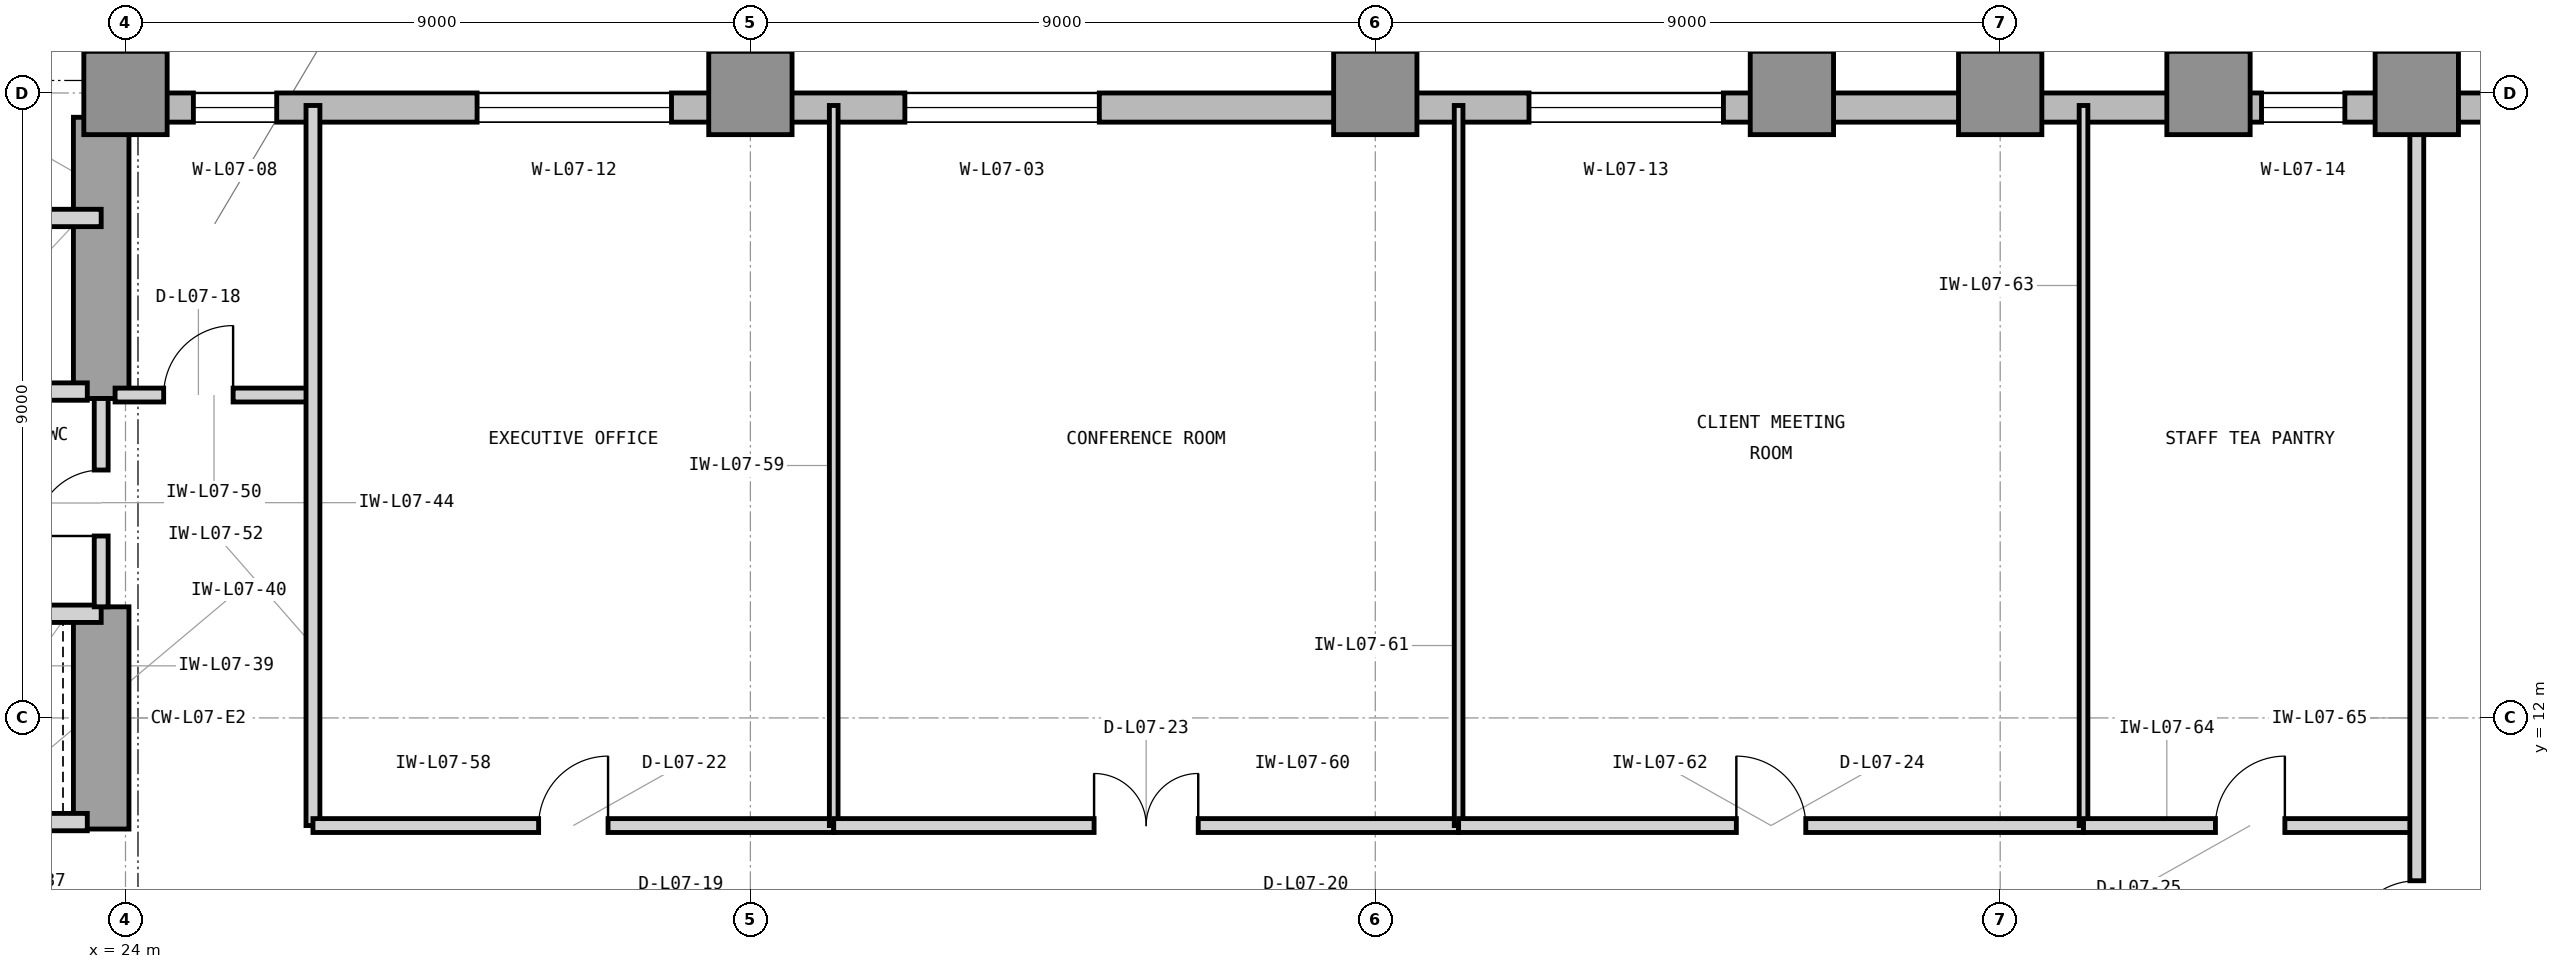
"""IFC4 building model, lengths in metres.
Left out: names, types, materials, properties, quantities, classifications, styles, units other than length and angle.
Written with IfcOpenShell. Run it as: python <this file> out.ifc"""

import sys

from ifc_helpers import new_model, si_unit, direction, frame, frame_2d, origin, origin_2d, place, context, subcontext, project, spatial, rectangle, extrude, element, fill, save


model = new_model("IFC4")
c1 = context("Model", 3, precision=1e-05, world=origin(), true_north=direction((0.0, 1.0)))
c2 = subcontext(c1, "Body", "Model", "MODEL_VIEW")
j1 = project(units=[si_unit("LENGTHUNIT", "METRE"), si_unit("PLANEANGLEUNIT", "RADIAN")], contexts=[c1])
p1 = place(None, origin())
s1 = spatial("IfcSite", under=j1, at=p1, CompositionType="ELEMENT")
p2 = place(p1, origin())
s2 = spatial("IfcBuilding", under=s1, at=p2, CompositionType="ELEMENT")
p3 = place(p2, frame((0.0, 0.0, 34.2)))
s3 = spatial("IfcBuildingStorey", under=s2, at=p3, CompositionType="ELEMENT", Elevation=34.2)
p4 = place(p3, frame((23.65, 10.4, 0.0), z_axis=(0.0, 0.0, 1.0), x_axis=(0.0, 1.0, 0.0)))
e1 = element("IfcWall", 1, at=p4, inside=s3, PredefinedType="SHEAR", context=c2, shape_type="SweptSolid", body=[
    extrude(rectangle(XDim=3.2, YDim=0.8, at=frame_2d((1.6, 0.0))), origin(), (0.0, 0.0, 1.0), 4.2),
])
p5 = place(p3, frame((23.65, 16.6, 0.0), z_axis=(0.0, 0.0, 1.0), x_axis=(0.0, 1.0, 0.0)))
e2 = element("IfcWall", 2, at=p5, inside=s3, PredefinedType="SHEAR", context=c2, shape_type="SweptSolid", body=[
    extrude(rectangle(XDim=4.05, YDim=0.8, at=frame_2d((2.025, 0.0))), origin(), (0.0, 0.0, 1.0), 4.2),
])
for number, where, z_axis, x_axis in (
    (3, (24.0, 21.0, 0.0), (0.0, 0.0, 1.0), (1.0, 0.0, 0.0)),
    (4, (33.0, 21.0, 0.0), (0.0, 0.0, 1.0), (1.0, 0.0, 0.0)),
    (5, (42.0, 21.0, 0.0), (0.0, 0.0, 1.0), (1.0, 0.0, 0.0)),
    (6, (48.0, 21.0, 0.0), (0.0, 0.0, 1.0), (1.0, 0.0, 0.0)),
    (7, (51.0, 21.0, 0.0), (0.0, 0.0, 1.0), (1.0, 0.0, 0.0)),
    (8, (54.0, 21.0, 0.0), (0.0, 0.0, 1.0), (1.0, 0.0, 0.0)),
    (9, (57.0, 21.0, 0.0), (0.0, 0.0, 1.0), (1.0, 0.0, 0.0)),
):
    element("IfcColumn", number, at=place(p3, frame(where, z_axis=z_axis, x_axis=x_axis)), inside=s3, PredefinedType="COLUMN", context=c2, shape_type="SweptSolid", body=[
        extrude(rectangle(XDim=1.2, YDim=1.2, at=origin_2d()), origin(), (0.0, 0.0, 1.0), 4.2),
    ])
p6 = place(p3, frame((64.4, 20.79, 0.0), z_axis=(0.0, 0.0, 1.0), x_axis=(-1.0, 0.0, 0.0)))
e10 = element("IfcWall", 10, at=p6, inside=s3, PredefinedType="STANDARD", context=c2, shape_type="SweptSolid", body=[
    extrude(rectangle(XDim=40.4, YDim=0.42, at=frame_2d((20.2, 0.0))), origin(), (0.0, 0.0, 1.0), 3.98),
])
p7 = place(p6, frame((26.375, 0.0, 0.85)))
e11 = element("IfcOpeningElement", 11, at=p7, cuts=e10, PredefinedType="OPENING", context=c2, shape_type="SweptSolid", body=[
    extrude(rectangle(XDim=2.8, YDim=2.45, at=frame_2d((1.4, 1.225))), frame((0.0, 0.22, 0.0), z_axis=(0.0, -1.0, 0.0), x_axis=(1.0, 0.0, 0.0)), (0.0, 0.0, 1.0), 0.44),
])
p8 = place(p6, frame((38.222, 0.0, 0.85)))
e12 = element("IfcOpeningElement", 12, at=p8, cuts=e10, PredefinedType="OPENING", context=c2, shape_type="SweptSolid", body=[
    extrude(rectangle(XDim=1.2, YDim=2.45, at=frame_2d((0.6, 1.225))), frame((0.0, 0.22, 0.0), z_axis=(0.0, -1.0, 0.0), x_axis=(1.0, 0.0, 0.0)), (0.0, 0.0, 1.0), 0.44),
])
p9 = place(p6, frame((32.536, 0.0, 0.85)))
e13 = element("IfcOpeningElement", 13, at=p9, cuts=e10, PredefinedType="OPENING", context=c2, shape_type="SweptSolid", body=[
    extrude(rectangle(XDim=2.8, YDim=2.45, at=frame_2d((1.4, 1.225))), frame((0.0, 0.22, 0.0), z_axis=(0.0, -1.0, 0.0), x_axis=(1.0, 0.0, 0.0)), (0.0, 0.0, 1.0), 0.44),
])
p10 = place(p6, frame((17.386, 0.0, 0.85)))
e14 = element("IfcOpeningElement", 14, at=p10, cuts=e10, PredefinedType="OPENING", context=c2, shape_type="SweptSolid", body=[
    extrude(rectangle(XDim=2.8, YDim=2.45, at=frame_2d((1.4, 1.225))), frame((0.0, 0.22, 0.0), z_axis=(0.0, -1.0, 0.0), x_axis=(1.0, 0.0, 0.0)), (0.0, 0.0, 1.0), 0.44),
])
p11 = place(p6, frame((8.436, 0.0, 0.85)))
e15 = element("IfcOpeningElement", 15, at=p11, cuts=e10, PredefinedType="OPENING", context=c2, shape_type="SweptSolid", body=[
    extrude(rectangle(XDim=1.2, YDim=2.45, at=frame_2d((0.6, 1.225))), frame((0.0, 0.22, 0.0), z_axis=(0.0, -1.0, 0.0), x_axis=(1.0, 0.0, 0.0)), (0.0, 0.0, 1.0), 0.44),
])
p12 = place(p3, frame((23.79, 21.0, 0.0), z_axis=(0.0, 0.0, 1.0), x_axis=(0.0, 1.0, 0.0)))
e16 = element("IfcWall", 16, at=p12, inside=s3, PredefinedType="STANDARD", context=c2, shape_type="SweptSolid", body=[
    extrude(rectangle(XDim=28.4, YDim=0.42, at=frame_2d((14.2, 0.0))), origin(), (0.0, 0.0, 1.0), 3.98),
])
p13 = place(p12, frame((10.433, 0.0, 0.85)))
e17 = element("IfcOpeningElement", 17, at=p13, cuts=e16, PredefinedType="OPENING", context=c2, shape_type="SweptSolid", body=[
    extrude(rectangle(XDim=2.8, YDim=2.45, at=frame_2d((1.4, 1.225))), frame((0.0, 0.22, 0.0), z_axis=(0.0, -1.0, 0.0), x_axis=(1.0, 0.0, 0.0)), (0.0, 0.0, 1.0), 0.44),
])
p14 = place(p12, frame((21.966, 0.0, 0.85)))
e18 = element("IfcOpeningElement", 18, at=p14, cuts=e16, PredefinedType="OPENING", context=c2, shape_type="SweptSolid", body=[
    extrude(rectangle(XDim=1.2, YDim=2.45, at=frame_2d((0.6, 1.225))), frame((0.0, 0.22, 0.0), z_axis=(0.0, -1.0, 0.0), x_axis=(1.0, 0.0, 0.0)), (0.0, 0.0, 1.0), 0.44),
])
p15 = place(p3, frame((21.05, 16.7, 0.0), z_axis=(0.0, 0.0, 1.0), x_axis=(1.0, 0.0, 0.0)))
e19 = element("IfcWall", 19, at=p15, inside=s3, PredefinedType="PARTITIONING", context=c2, shape_type="SweptSolid", body=[
    extrude(rectangle(XDim=2.4, YDim=0.25, at=frame_2d((1.2, 0.0))), origin(), (0.0, 0.0, 1.0), 3.426),
])
p16 = place(p3, frame((16.45, 19.2, 0.0), z_axis=(0.0, 0.0, 1.0), x_axis=(1.0, 0.0, 0.0)))
e20 = element("IfcWall", 20, at=p16, inside=s3, PredefinedType="PARTITIONING", context=c2, shape_type="SweptSolid", body=[
    extrude(rectangle(XDim=7.2, YDim=0.25, at=frame_2d((3.6, 0.0))), origin(), (0.0, 0.0, 1.0), 3.97),
])
p17 = place(p3, frame((21.05, 10.5, 0.0), z_axis=(0.0, 0.0, 1.0), x_axis=(1.0, 0.0, 0.0)))
e21 = element("IfcWall", 21, at=p17, inside=s3, PredefinedType="PARTITIONING", context=c2, shape_type="SweptSolid", body=[
    extrude(rectangle(XDim=2.4, YDim=0.25, at=frame_2d((1.2, 0.0))), origin(), (0.0, 0.0, 1.0), 3.426),
])
p18 = place(p3, frame((14.7, 13.5, 0.0), z_axis=(0.0, 0.0, 1.0), x_axis=(1.0, 0.0, 0.0)))
e22 = element("IfcWall", 22, at=p18, inside=s3, PredefinedType="PARTITIONING", context=c2, shape_type="SweptSolid", body=[
    extrude(rectangle(XDim=8.95, YDim=0.25, at=frame_2d((4.475, 0.0))), origin(), (0.0, 0.0, 1.0), 3.426),
])
p19 = place(p3, frame((23.65, 13.6, 0.0), z_axis=(0.0, 0.0, 1.0), x_axis=(0.0, 1.0, 0.0)))
e23 = element("IfcWall", 23, at=p19, inside=s3, PredefinedType="PARTITIONING", context=c2, shape_type="SweptSolid", body=[
    extrude(rectangle(XDim=3.0, YDim=0.2, at=frame_2d((1.5, 0.0))), origin(), (0.0, 0.0, 1.0), 3.97),
])
p20 = place(p19, frame((1.02, 0.0, 0.0)))
e24 = element("IfcOpeningElement", 24, at=p20, cuts=e23, PredefinedType="OPENING", context=c2, shape_type="SweptSolid", body=[
    extrude(rectangle(XDim=0.95, YDim=2.1, at=frame_2d((0.475, 1.05))), frame((0.0, 0.11, 0.0), z_axis=(0.0, -1.0, 0.0), x_axis=(1.0, 0.0, 0.0)), (0.0, 0.0, 1.0), 0.22),
])
p21 = place(p3, frame((23.85, 16.65, 0.0), z_axis=(0.0, 0.0, 1.0), x_axis=(1.0, 0.0, 0.0)))
e25 = element("IfcWall", 25, at=p21, inside=s3, PredefinedType="PARTITIONING", context=c2, shape_type="SweptSolid", body=[
    extrude(rectangle(XDim=2.85, YDim=0.2, at=frame_2d((1.425, 0.0))), origin(), (0.0, 0.0, 1.0), 3.97),
])
p22 = place(p21, frame((0.7, 0.0, 0.0)))
e26 = element("IfcOpeningElement", 26, at=p22, cuts=e25, PredefinedType="OPENING", context=c2, shape_type="SweptSolid", body=[
    extrude(rectangle(XDim=1.0, YDim=2.15, at=frame_2d((0.5, 1.075))), frame((0.0, 0.11, 0.0), z_axis=(0.0, -1.0, 0.0), x_axis=(1.0, 0.0, 0.0)), (0.0, 0.0, 1.0), 0.22),
])
p23 = place(p3, frame((26.7, 10.45, 0.0), z_axis=(0.0, 0.0, 1.0), x_axis=(0.0, 1.0, 0.0)))
e27 = element("IfcWall", 27, at=p23, inside=s3, PredefinedType="PARTITIONING", context=c2, shape_type="SweptSolid", body=[
    extrude(rectangle(XDim=10.37, YDim=0.2, at=frame_2d((5.185, 0.0))), origin(), (0.0, 0.0, 1.0), 3.97),
])
p24 = place(p3, frame((26.7, 10.45, 0.0), z_axis=(0.0, 0.0, 1.0), x_axis=(1.0, 0.0, 0.0)))
e28 = element("IfcWall", 28, at=p24, inside=s3, PredefinedType="PARTITIONING", context=c2, shape_type="SweptSolid", body=[
    extrude(rectangle(XDim=7.5, YDim=0.2, at=frame_2d((3.75, 0.0))), origin(), (0.0, 0.0, 1.0), 3.97),
])
p25 = place(p24, frame((3.25, 0.0, 0.0)))
e29 = element("IfcOpeningElement", 29, at=p25, cuts=e28, PredefinedType="OPENING", context=c2, shape_type="SweptSolid", body=[
    extrude(rectangle(XDim=1.0, YDim=2.15, at=frame_2d((0.5, 1.075))), frame((0.0, 0.11, 0.0), z_axis=(0.0, -1.0, 0.0), x_axis=(1.0, 0.0, 0.0)), (0.0, 0.0, 1.0), 0.22),
])
p26 = place(p3, frame((34.2, 10.45, 0.0), z_axis=(0.0, 0.0, 1.0), x_axis=(0.0, 1.0, 0.0)))
e30 = element("IfcWall", 30, at=p26, inside=s3, PredefinedType="PARTITIONING", context=c2, shape_type="SweptSolid", body=[
    extrude(rectangle(XDim=10.37, YDim=0.125, at=frame_2d((5.185, 0.0))), origin(), (0.0, 0.0, 1.0), 3.97),
])
p27 = place(p3, frame((34.2, 10.45, 0.0), z_axis=(0.0, 0.0, 1.0), x_axis=(1.0, 0.0, 0.0)))
e31 = element("IfcWall", 31, at=p27, inside=s3, PredefinedType="PARTITIONING", context=c2, shape_type="SweptSolid", body=[
    extrude(rectangle(XDim=9.0, YDim=0.2, at=frame_2d((4.5, 0.0))), origin(), (0.0, 0.0, 1.0), 3.97),
])
p28 = place(p27, frame((3.75, 0.0, 0.0)))
e32 = element("IfcOpeningElement", 32, at=p28, cuts=e31, PredefinedType="OPENING", context=c2, shape_type="SweptSolid", body=[
    extrude(rectangle(XDim=1.5, YDim=2.3, at=frame_2d((0.75, 1.15))), frame((0.0, 0.11, 0.0), z_axis=(0.0, -1.0, 0.0), x_axis=(1.0, 0.0, 0.0)), (0.0, 0.0, 1.0), 0.22),
])
p29 = place(p3, frame((43.2, 10.45, 0.0), z_axis=(0.0, 0.0, 1.0), x_axis=(0.0, 1.0, 0.0)))
e33 = element("IfcWall", 33, at=p29, inside=s3, PredefinedType="PARTITIONING", context=c2, shape_type="SweptSolid", body=[
    extrude(rectangle(XDim=10.37, YDim=0.125, at=frame_2d((5.185, 0.0))), origin(), (0.0, 0.0, 1.0), 3.97),
])
p30 = place(p3, frame((43.2, 10.45, 0.0), z_axis=(0.0, 0.0, 1.0), x_axis=(1.0, 0.0, 0.0)))
e34 = element("IfcWall", 34, at=p30, inside=s3, PredefinedType="PARTITIONING", context=c2, shape_type="SweptSolid", body=[
    extrude(rectangle(XDim=9.0, YDim=0.2, at=frame_2d((4.5, 0.0))), origin(), (0.0, 0.0, 1.0), 3.97),
])
p31 = place(p30, frame((4.0, 0.0, 0.0)))
e35 = element("IfcOpeningElement", 35, at=p31, cuts=e34, PredefinedType="OPENING", context=c2, shape_type="SweptSolid", body=[
    extrude(rectangle(XDim=1.0, YDim=2.15, at=frame_2d((0.5, 1.075))), frame((0.0, 0.11, 0.0), z_axis=(0.0, -1.0, 0.0), x_axis=(1.0, 0.0, 0.0)), (0.0, 0.0, 1.0), 0.22),
])
p32 = place(p3, frame((52.2, 10.45, 0.0), z_axis=(0.0, 0.0, 1.0), x_axis=(0.0, 1.0, 0.0)))
e36 = element("IfcWall", 36, at=p32, inside=s3, PredefinedType="PARTITIONING", context=c2, shape_type="SweptSolid", body=[
    extrude(rectangle(XDim=10.37, YDim=0.125, at=frame_2d((5.185, 0.0))), origin(), (0.0, 0.0, 1.0), 3.97),
])
p33 = place(p3, frame((52.2, 10.45, 0.0), z_axis=(0.0, 0.0, 1.0), x_axis=(1.0, 0.0, 0.0)))
e37 = element("IfcWall", 37, at=p33, inside=s3, PredefinedType="PARTITIONING", context=c2, shape_type="SweptSolid", body=[
    extrude(rectangle(XDim=4.8, YDim=0.2, at=frame_2d((2.4, 0.0))), origin(), (0.0, 0.0, 1.0), 3.97),
])
p34 = place(p33, frame((1.9, 0.0, 0.0)))
e38 = element("IfcOpeningElement", 38, at=p34, cuts=e37, PredefinedType="OPENING", context=c2, shape_type="SweptSolid", body=[
    extrude(rectangle(XDim=1.0, YDim=2.15, at=frame_2d((0.5, 1.075))), frame((0.0, 0.11, 0.0), z_axis=(0.0, -1.0, 0.0), x_axis=(1.0, 0.0, 0.0)), (0.0, 0.0, 1.0), 0.22),
])
p35 = place(p3, frame((57.0, 3.18, 0.0), z_axis=(0.0, 0.0, 1.0), x_axis=(0.0, 1.0, 0.0)))
e39 = element("IfcWall", 39, at=p35, inside=s3, PredefinedType="PARTITIONING", context=c2, shape_type="SweptSolid", body=[
    extrude(rectangle(XDim=17.64, YDim=0.2, at=frame_2d((8.82, 0.0))), origin(), (0.0, 0.0, 1.0), 3.114),
])
p36 = place(p35, frame((5.475, 0.0, 0.0)))
e40 = element("IfcOpeningElement", 40, at=p36, cuts=e39, PredefinedType="OPENING", context=c2, shape_type="SweptSolid", body=[
    extrude(rectangle(XDim=1.0, YDim=2.15, at=frame_2d((0.5, 1.075))), frame((0.0, 0.11, 0.0), z_axis=(0.0, -1.0, 0.0), x_axis=(1.0, 0.0, 0.0)), (0.0, 0.0, 1.0), 0.22),
])
p37 = place(p7, origin())
e41 = element("IfcWindow", 41, at=p37, inside=s3, PartitioningType="SINGLE_PANEL", PredefinedType="WINDOW", context=c2, shape_type="SweptSolid", body=[
    extrude(rectangle(XDim=2.8, YDim=2.45, at=frame_2d((1.4, 1.225))), frame((0.0, 0.11, 0.0), z_axis=(0.0, -1.0, 0.0), x_axis=(1.0, 0.0, 0.0)), (0.0, 0.0, 1.0), 0.06),
])
fill(e11, e41)
p38 = place(p20, origin())
e42 = element("IfcDoor", 42, at=p38, inside=s3, OperationType="SINGLE_SWING_LEFT", PredefinedType="DOOR", context=c2, shape_type="SweptSolid", body=[
    extrude(rectangle(XDim=0.95, YDim=2.1, at=frame_2d((0.475, 1.05))), frame((0.0, 0.025, 0.0), z_axis=(0.0, -1.0, 0.0), x_axis=(1.0, 0.0, 0.0)), (0.0, 0.0, 1.0), 0.05),
])
fill(e24, e42)
p39 = place(p22, origin())
e43 = element("IfcDoor", 43, at=p39, inside=s3, OperationType="SINGLE_SWING_RIGHT", PredefinedType="DOOR", context=c2, shape_type="SweptSolid", body=[
    extrude(rectangle(XDim=1.0, YDim=2.15, at=frame_2d((0.5, 1.075))), frame((0.0, 0.025, 0.0), z_axis=(0.0, -1.0, 0.0), x_axis=(1.0, 0.0, 0.0)), (0.0, 0.0, 1.0), 0.05),
])
fill(e26, e43)
p40 = place(p25, origin())
e44 = element("IfcDoor", 44, at=p40, inside=s3, OperationType="SINGLE_SWING_RIGHT", PredefinedType="DOOR", context=c2, shape_type="SweptSolid", body=[
    extrude(rectangle(XDim=1.0, YDim=2.15, at=frame_2d((0.5, 1.075))), frame((0.0, 0.025, 0.0), z_axis=(0.0, -1.0, 0.0), x_axis=(1.0, 0.0, 0.0)), (0.0, 0.0, 1.0), 0.05),
])
fill(e29, e44)
p41 = place(p28, origin())
e45 = element("IfcDoor", 45, at=p41, inside=s3, OperationType="DOUBLE_DOOR_SINGLE_SWING", PredefinedType="DOOR", context=c2, shape_type="SweptSolid", body=[
    extrude(rectangle(XDim=1.5, YDim=2.3, at=frame_2d((0.75, 1.15))), frame((0.0, 0.025, 0.0), z_axis=(0.0, -1.0, 0.0), x_axis=(1.0, 0.0, 0.0)), (0.0, 0.0, 1.0), 0.05),
])
fill(e32, e45)
p42 = place(p31, origin())
e46 = element("IfcDoor", 46, at=p42, inside=s3, OperationType="SINGLE_SWING_LEFT", PredefinedType="DOOR", context=c2, shape_type="SweptSolid", body=[
    extrude(rectangle(XDim=1.0, YDim=2.15, at=frame_2d((0.5, 1.075))), frame((0.0, 0.025, 0.0), z_axis=(0.0, -1.0, 0.0), x_axis=(1.0, 0.0, 0.0)), (0.0, 0.0, 1.0), 0.05),
])
fill(e35, e46)
p43 = place(p34, origin())
e47 = element("IfcDoor", 47, at=p43, inside=s3, OperationType="SINGLE_SWING_RIGHT", PredefinedType="DOOR", context=c2, shape_type="SweptSolid", body=[
    extrude(rectangle(XDim=1.0, YDim=2.15, at=frame_2d((0.5, 1.075))), frame((0.0, 0.025, 0.0), z_axis=(0.0, -1.0, 0.0), x_axis=(1.0, 0.0, 0.0)), (0.0, 0.0, 1.0), 0.05),
])
fill(e38, e47)
p44 = place(p36, origin())
e48 = element("IfcDoor", 48, at=p44, inside=s3, OperationType="SINGLE_SWING_LEFT", PredefinedType="DOOR", context=c2, shape_type="SweptSolid", body=[
    extrude(rectangle(XDim=1.0, YDim=2.15, at=frame_2d((0.5, 1.075))), frame((0.0, 0.025, 0.0), z_axis=(0.0, -1.0, 0.0), x_axis=(1.0, 0.0, 0.0)), (0.0, 0.0, 1.0), 0.05),
])
fill(e40, e48)
p45 = place(p8, origin())
e49 = element("IfcWindow", 49, at=p45, inside=s3, PartitioningType="SINGLE_PANEL", PredefinedType="WINDOW", context=c2, shape_type="SweptSolid", body=[
    extrude(rectangle(XDim=1.2, YDim=2.45, at=frame_2d((0.6, 1.225))), frame((0.0, 0.11, 0.0), z_axis=(0.0, -1.0, 0.0), x_axis=(1.0, 0.0, 0.0)), (0.0, 0.0, 1.0), 0.06),
])
fill(e12, e49)
p46 = place(p9, origin())
e50 = element("IfcWindow", 50, at=p46, inside=s3, PartitioningType="SINGLE_PANEL", PredefinedType="WINDOW", context=c2, shape_type="SweptSolid", body=[
    extrude(rectangle(XDim=2.8, YDim=2.45, at=frame_2d((1.4, 1.225))), frame((0.0, 0.11, 0.0), z_axis=(0.0, -1.0, 0.0), x_axis=(1.0, 0.0, 0.0)), (0.0, 0.0, 1.0), 0.06),
])
fill(e13, e50)
p47 = place(p10, origin())
e51 = element("IfcWindow", 51, at=p47, inside=s3, PartitioningType="SINGLE_PANEL", PredefinedType="WINDOW", context=c2, shape_type="SweptSolid", body=[
    extrude(rectangle(XDim=2.8, YDim=2.45, at=frame_2d((1.4, 1.225))), frame((0.0, 0.11, 0.0), z_axis=(0.0, -1.0, 0.0), x_axis=(1.0, 0.0, 0.0)), (0.0, 0.0, 1.0), 0.06),
])
fill(e14, e51)
p48 = place(p11, origin())
e52 = element("IfcWindow", 52, at=p48, inside=s3, PartitioningType="SINGLE_PANEL", PredefinedType="WINDOW", context=c2, shape_type="SweptSolid", body=[
    extrude(rectangle(XDim=1.2, YDim=2.45, at=frame_2d((0.6, 1.225))), frame((0.0, 0.11, 0.0), z_axis=(0.0, -1.0, 0.0), x_axis=(1.0, 0.0, 0.0)), (0.0, 0.0, 1.0), 0.06),
])
fill(e15, e52)
save(model, sys.argv[1])
